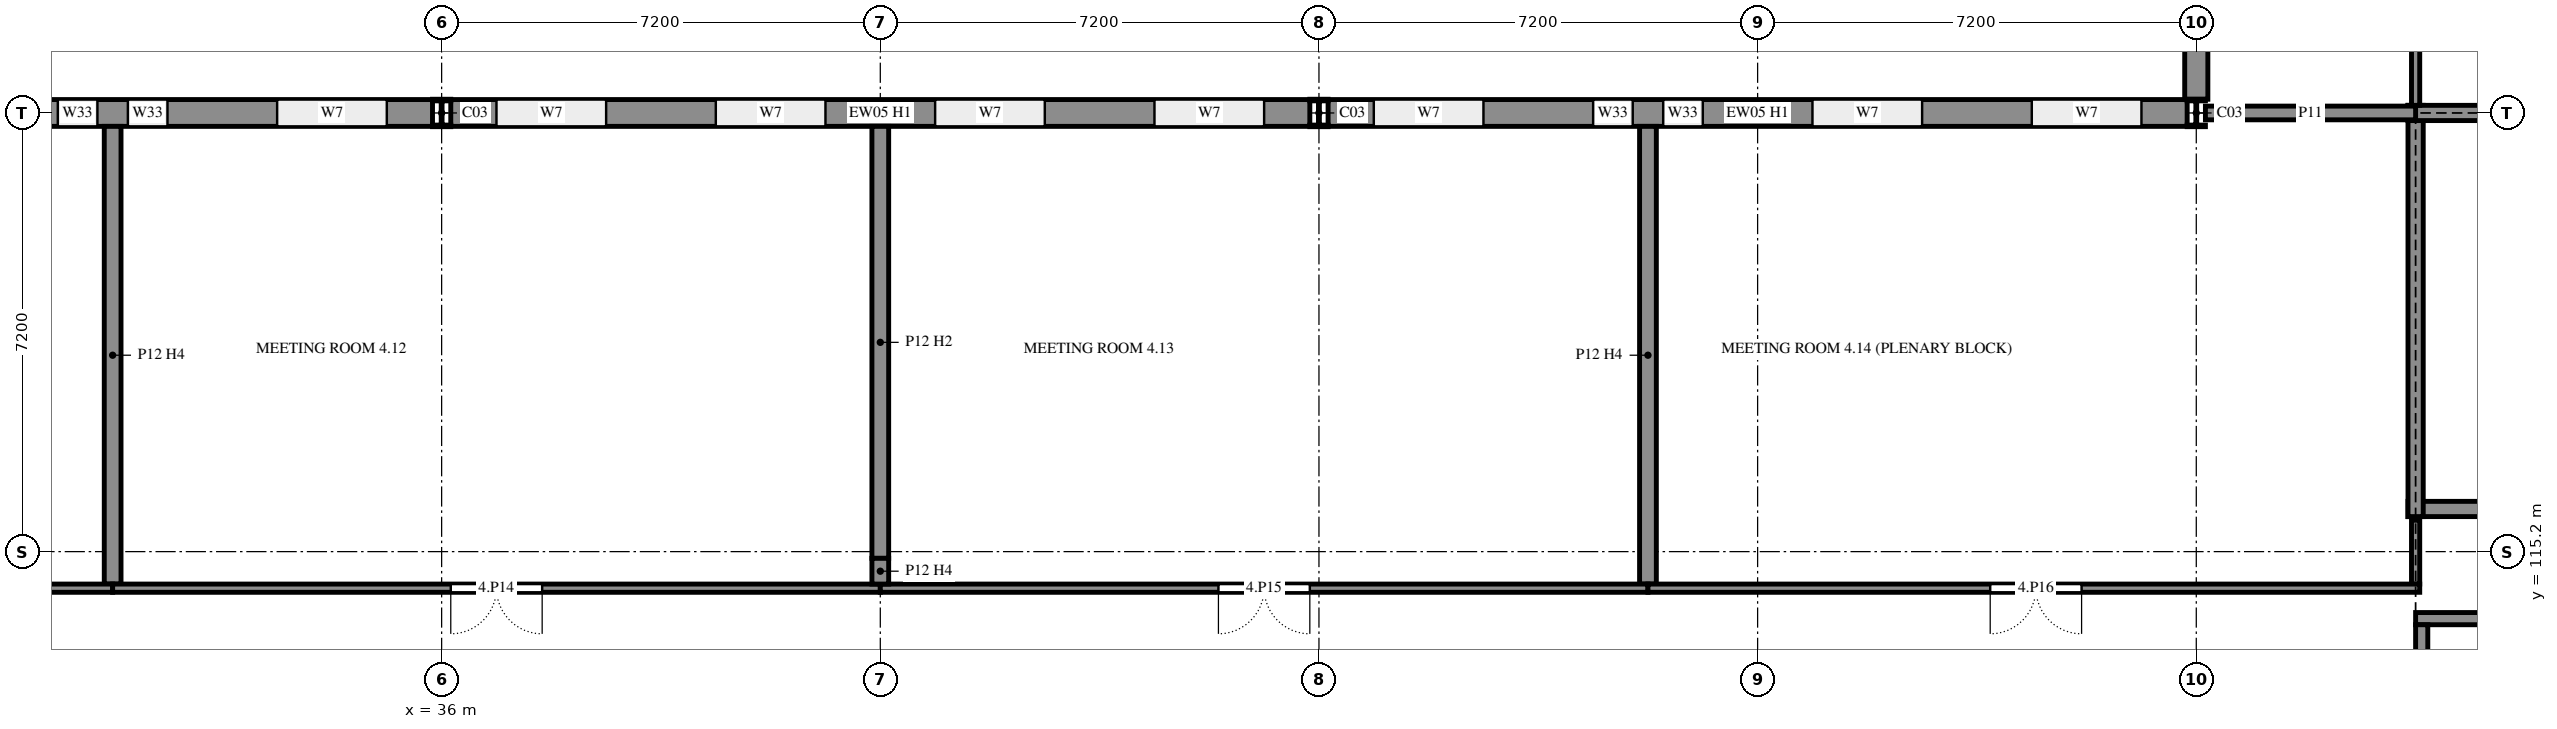
"""IFC4 building model, lengths in metres.
Left out: names, types, materials, properties, quantities, classifications, styles, units other than length and angle.
Written with IfcOpenShell. Run it as: python <this file> out.ifc"""

import sys

from ifc_helpers import new_model, si_unit, direction, frame, frame_2d, origin, origin_2d, place, context, subcontext, project, spatial, rectangle, i_section, extrude, element, fill, save


model = new_model("IFC4")
c1 = context("Model", 3, precision=1e-05, world=origin(), true_north=direction((0.0, 1.0)))
c2 = subcontext(c1, "Body", "Model", "MODEL_VIEW")
j1 = project(units=[si_unit("LENGTHUNIT", "METRE"), si_unit("PLANEANGLEUNIT", "RADIAN")], contexts=[c1])
p1 = place(None, origin())
s1 = spatial("IfcSite", under=j1, at=p1, CompositionType="ELEMENT")
p2 = place(p1, origin())
s2 = spatial("IfcBuilding", under=s1, at=p2, CompositionType="ELEMENT")
p3 = place(p2, frame((0.0, 0.0, 14.4)))
s3 = spatial("IfcBuildingStorey", under=s2, at=p3, CompositionType="ELEMENT", Elevation=14.4)
for number, where, z_axis, x_axis in (
    (1, (36.0, 122.4, 0.0), (0.0, 0.0, 1.0), (1.0, 0.0, 0.0)),
    (2, (50.4, 122.4, 0.0), (0.0, 0.0, 1.0), (1.0, 0.0, 0.0)),
    (3, (64.8, 122.4, 0.0), (0.0, 0.0, 1.0), (1.0, 0.0, 0.0)),
):
    element("IfcColumn", number, at=place(p3, frame(where, z_axis=z_axis, x_axis=x_axis)), inside=s3, PredefinedType="COLUMN", context=c2, shape_type="SweptSolid", body=[
        extrude(i_section(OverallWidth=0.3, OverallDepth=0.45, WebThickness=0.014, FlangeThickness=0.026, FilletRadius=0.027, at=origin_2d()), origin(), (0.0, 0.0, 1.0), 3.6),
    ])
p4 = place(p3, frame((68.275, 115.9, 0.0), z_axis=(0.0, 0.0, 1.0), x_axis=(1.0, 0.0, 0.0)))
e4 = element("IfcWall", 4, at=p4, inside=s3, PredefinedType="SHEAR", context=c2, shape_type="SweptSolid", body=[
    extrude(rectangle(XDim=5.25, YDim=0.25, at=frame_2d((2.625, 0.0))), origin(), (0.0, 0.0, 1.0), 3.6),
])
p5 = place(p4, frame((1.975, 0.0, 0.0)))
e5 = element("IfcOpeningElement", 5, at=p5, cuts=e4, PredefinedType="OPENING", context=c2, shape_type="SweptSolid", body=[
    extrude(rectangle(XDim=1.2, YDim=2.4, at=frame_2d((0.6, 1.2))), frame((0.0, 0.135, 0.0), z_axis=(0.0, -1.0, 0.0), x_axis=(1.0, 0.0, 0.0)), (0.0, 0.0, 1.0), 0.27),
])
p6 = place(p3, frame((68.4, 122.525, 0.0), z_axis=(0.0, 0.0, 1.0), x_axis=(0.0, -1.0, 0.0)))
e6 = element("IfcWall", 6, at=p6, inside=s3, PredefinedType="SHEAR", context=c2, shape_type="SweptSolid", body=[
    extrude(rectangle(XDim=6.75, YDim=0.25, at=frame_2d((3.375, 0.0))), origin(), (0.0, 0.0, 1.0), 3.6),
])
p7 = place(p3, frame((73.525, 122.4, 0.0), z_axis=(0.0, 0.0, 1.0), x_axis=(-1.0, 0.0, 0.0)))
e7 = element("IfcWall", 7, at=p7, inside=s3, PredefinedType="SHEAR", context=c2, shape_type="SweptSolid", body=[
    extrude(rectangle(XDim=5.25, YDim=0.25, at=frame_2d((2.625, 0.0))), origin(), (0.0, 0.0, 1.0), 3.6),
])
p8 = place(p3, frame((64.65, 122.4, 0.0), z_axis=(0.0, 0.0, 1.0), x_axis=(-1.0, 0.0, 0.0)))
e8 = element("IfcWall", 8, at=p8, inside=s3, PredefinedType="SOLIDWALL", context=c2, shape_type="SweptSolid", body=[
    extrude(rectangle(XDim=14.1, YDim=0.44, at=frame_2d((7.05, 0.0))), origin(), (0.0, 0.0, 1.0), 2.82),
])
p9 = place(p8, frame((11.55, 0.0, 0.75)))
e9 = element("IfcOpeningElement", 9, at=p9, cuts=e8, PredefinedType="OPENING", context=c2, shape_type="SweptSolid", body=[
    extrude(rectangle(XDim=1.8, YDim=1.8, at=frame_2d((0.9, 0.9))), frame((0.0, 0.23, 0.0), z_axis=(0.0, -1.0, 0.0), x_axis=(1.0, 0.0, 0.0)), (0.0, 0.0, 1.0), 0.46),
])
p10 = place(p8, frame((7.95, 0.0, 0.75)))
e10 = element("IfcOpeningElement", 10, at=p10, cuts=e8, PredefinedType="OPENING", context=c2, shape_type="SweptSolid", body=[
    extrude(rectangle(XDim=0.65, YDim=1.8, at=frame_2d((0.325, 0.9))), frame((0.0, 0.23, 0.0), z_axis=(0.0, -1.0, 0.0), x_axis=(1.0, 0.0, 0.0)), (0.0, 0.0, 1.0), 0.46),
])
p11 = place(p8, frame((9.1, 0.0, 0.75)))
e11 = element("IfcOpeningElement", 11, at=p11, cuts=e8, PredefinedType="OPENING", context=c2, shape_type="SweptSolid", body=[
    extrude(rectangle(XDim=0.65, YDim=1.8, at=frame_2d((0.325, 0.9))), frame((0.0, 0.23, 0.0), z_axis=(0.0, -1.0, 0.0), x_axis=(1.0, 0.0, 0.0)), (0.0, 0.0, 1.0), 0.46),
])
p12 = place(p8, frame((4.35, 0.0, 0.75)))
e12 = element("IfcOpeningElement", 12, at=p12, cuts=e8, PredefinedType="OPENING", context=c2, shape_type="SweptSolid", body=[
    extrude(rectangle(XDim=1.8, YDim=1.8, at=frame_2d((0.9, 0.9))), frame((0.0, 0.23, 0.0), z_axis=(0.0, -1.0, 0.0), x_axis=(1.0, 0.0, 0.0)), (0.0, 0.0, 1.0), 0.46),
])
p13 = place(p8, frame((0.75, 0.0, 0.75)))
e13 = element("IfcOpeningElement", 13, at=p13, cuts=e8, PredefinedType="OPENING", context=c2, shape_type="SweptSolid", body=[
    extrude(rectangle(XDim=1.8, YDim=1.8, at=frame_2d((0.9, 0.9))), frame((0.0, 0.23, 0.0), z_axis=(0.0, -1.0, 0.0), x_axis=(1.0, 0.0, 0.0)), (0.0, 0.0, 1.0), 0.46),
])
p14 = place(p3, frame((50.25, 122.4, 0.0), z_axis=(0.0, 0.0, 1.0), x_axis=(-1.0, 0.0, 0.0)))
e14 = element("IfcWall", 14, at=p14, inside=s3, PredefinedType="SOLIDWALL", context=c2, shape_type="SweptSolid", body=[
    extrude(rectangle(XDim=14.1, YDim=0.44, at=frame_2d((7.05, 0.0))), origin(), (0.0, 0.0, 1.0), 2.82),
])
p15 = place(p14, frame((11.55, 0.0, 0.75)))
e15 = element("IfcOpeningElement", 15, at=p15, cuts=e14, PredefinedType="OPENING", context=c2, shape_type="SweptSolid", body=[
    extrude(rectangle(XDim=1.8, YDim=1.8, at=frame_2d((0.9, 0.9))), frame((0.0, 0.23, 0.0), z_axis=(0.0, -1.0, 0.0), x_axis=(1.0, 0.0, 0.0)), (0.0, 0.0, 1.0), 0.46),
])
p16 = place(p14, frame((7.95, 0.0, 0.75)))
e16 = element("IfcOpeningElement", 16, at=p16, cuts=e14, PredefinedType="OPENING", context=c2, shape_type="SweptSolid", body=[
    extrude(rectangle(XDim=1.8, YDim=1.8, at=frame_2d((0.9, 0.9))), frame((0.0, 0.23, 0.0), z_axis=(0.0, -1.0, 0.0), x_axis=(1.0, 0.0, 0.0)), (0.0, 0.0, 1.0), 0.46),
])
p17 = place(p14, frame((4.35, 0.0, 0.75)))
e17 = element("IfcOpeningElement", 17, at=p17, cuts=e14, PredefinedType="OPENING", context=c2, shape_type="SweptSolid", body=[
    extrude(rectangle(XDim=1.8, YDim=1.8, at=frame_2d((0.9, 0.9))), frame((0.0, 0.23, 0.0), z_axis=(0.0, -1.0, 0.0), x_axis=(1.0, 0.0, 0.0)), (0.0, 0.0, 1.0), 0.46),
])
p18 = place(p14, frame((0.75, 0.0, 0.75)))
e18 = element("IfcOpeningElement", 18, at=p18, cuts=e14, PredefinedType="OPENING", context=c2, shape_type="SweptSolid", body=[
    extrude(rectangle(XDim=1.8, YDim=1.8, at=frame_2d((0.9, 0.9))), frame((0.0, 0.23, 0.0), z_axis=(0.0, -1.0, 0.0), x_axis=(1.0, 0.0, 0.0)), (0.0, 0.0, 1.0), 0.46),
])
p19 = place(p3, frame((35.85, 122.4, 0.0), z_axis=(0.0, 0.0, 1.0), x_axis=(-1.0, 0.0, 0.0)))
e19 = element("IfcWall", 19, at=p19, inside=s3, PredefinedType="SOLIDWALL", context=c2, shape_type="SweptSolid", body=[
    extrude(rectangle(XDim=14.1, YDim=0.44, at=frame_2d((7.05, 0.0))), origin(), (0.0, 0.0, 1.0), 2.82),
])
p20 = place(p19, frame((11.55, 0.0, 0.75)))
e20 = element("IfcOpeningElement", 20, at=p20, cuts=e19, PredefinedType="OPENING", context=c2, shape_type="SweptSolid", body=[
    extrude(rectangle(XDim=1.8, YDim=1.8, at=frame_2d((0.9, 0.9))), frame((0.0, 0.23, 0.0), z_axis=(0.0, -1.0, 0.0), x_axis=(1.0, 0.0, 0.0)), (0.0, 0.0, 1.0), 0.46),
])
p21 = place(p19, frame((7.95, 0.0, 0.75)))
e21 = element("IfcOpeningElement", 21, at=p21, cuts=e19, PredefinedType="OPENING", context=c2, shape_type="SweptSolid", body=[
    extrude(rectangle(XDim=1.8, YDim=1.8, at=frame_2d((0.9, 0.9))), frame((0.0, 0.23, 0.0), z_axis=(0.0, -1.0, 0.0), x_axis=(1.0, 0.0, 0.0)), (0.0, 0.0, 1.0), 0.46),
])
p22 = place(p19, frame((4.35, 0.0, 0.75)))
e22 = element("IfcOpeningElement", 22, at=p22, cuts=e19, PredefinedType="OPENING", context=c2, shape_type="SweptSolid", body=[
    extrude(rectangle(XDim=0.65, YDim=1.8, at=frame_2d((0.325, 0.9))), frame((0.0, 0.23, 0.0), z_axis=(0.0, -1.0, 0.0), x_axis=(1.0, 0.0, 0.0)), (0.0, 0.0, 1.0), 0.46),
])
p23 = place(p19, frame((5.5, 0.0, 0.75)))
e23 = element("IfcOpeningElement", 23, at=p23, cuts=e19, PredefinedType="OPENING", context=c2, shape_type="SweptSolid", body=[
    extrude(rectangle(XDim=0.65, YDim=1.8, at=frame_2d((0.325, 0.9))), frame((0.0, 0.23, 0.0), z_axis=(0.0, -1.0, 0.0), x_axis=(1.0, 0.0, 0.0)), (0.0, 0.0, 1.0), 0.46),
])
p24 = place(p19, frame((0.75, 0.0, 0.75)))
e24 = element("IfcOpeningElement", 24, at=p24, cuts=e19, PredefinedType="OPENING", context=c2, shape_type="SweptSolid", body=[
    extrude(rectangle(XDim=1.8, YDim=1.8, at=frame_2d((0.9, 0.9))), frame((0.0, 0.23, 0.0), z_axis=(0.0, -1.0, 0.0), x_axis=(1.0, 0.0, 0.0)), (0.0, 0.0, 1.0), 0.46),
])
p25 = place(p3, frame((64.8, 131.775, 0.0), z_axis=(0.0, 0.0, 1.0), x_axis=(0.0, -1.0, 0.0)))
e25 = element("IfcWall", 25, at=p25, inside=s3, PredefinedType="SOLIDWALL", context=c2, shape_type="SweptSolid", body=[
    extrude(rectangle(XDim=9.15, YDim=0.38, at=frame_2d((4.575, 0.0))), origin(), (0.0, 0.0, 1.0), 3.06),
])
p26 = place(p3, frame((64.95, 122.4, 0.0), z_axis=(0.0, 0.0, 1.0), x_axis=(1.0, 0.0, 0.0)))
e26 = element("IfcWall", 26, at=p26, inside=s3, PredefinedType="PARTITIONING", context=c2, shape_type="SweptSolid", body=[
    extrude(rectangle(XDim=3.45, YDim=0.225, at=frame_2d((1.725, 0.0))), origin(), (0.0, 0.0, 1.0), 3.22),
])
p27 = place(p3, frame((68.4, 114.1, 0.0), z_axis=(0.0, 0.0, 1.0), x_axis=(1.0, 0.0, 0.0)))
e27 = element("IfcWall", 27, at=p27, inside=s3, PredefinedType="SHEAR", context=c2, shape_type="SweptSolid", body=[
    extrude(rectangle(XDim=3.0, YDim=0.2, at=frame_2d((1.5, 0.0))), origin(), (0.0, 0.0, 1.0), 4.5),
])
p28 = place(p3, frame((68.5, 111.8, 0.0), z_axis=(0.0, 0.0, 1.0), x_axis=(0.0, 1.0, 0.0)))
e28 = element("IfcWall", 28, at=p28, inside=s3, PredefinedType="SHEAR", context=c2, shape_type="SweptSolid", body=[
    extrude(rectangle(XDim=2.2, YDim=0.2, at=frame_2d((1.1, 0.0))), origin(), (0.0, 0.0, 1.0), 4.5),
])
p29 = place(p3, frame((68.4, 114.667, 0.0), z_axis=(0.0, 0.0, 1.0), x_axis=(0.0, 1.0, 0.0)))
e29 = element("IfcWall", 29, at=p29, inside=s3, PredefinedType="PARTITIONING", context=c2, shape_type="SweptSolid", body=[
    extrude(rectangle(XDim=1.048, YDim=0.135, at=frame_2d((0.524, 0.0))), origin(), (0.0, 0.0, 1.0), 3.42),
])
p30 = place(p3, frame((30.6, 122.18, 0.0), z_axis=(0.0, 0.0, 1.0), x_axis=(0.0, -1.0, 0.0)))
e30 = element("IfcWall", 30, at=p30, inside=s3, PredefinedType="PARTITIONING", context=c2, shape_type="SweptSolid", body=[
    extrude(rectangle(XDim=7.512, YDim=0.275, at=frame_2d((3.756, 0.0))), origin(), (0.0, 0.0, 1.0), 3.42),
])
p31 = place(p3, frame((30.6, 114.6, 0.0), z_axis=(0.0, 0.0, 1.0), x_axis=(-1.0, 0.0, 0.0)))
e31 = element("IfcWall", 31, at=p31, inside=s3, PredefinedType="PARTITIONING", context=c2, shape_type="SweptSolid", body=[
    extrude(rectangle(XDim=12.667, YDim=0.135, at=frame_2d((6.334, 0.0))), origin(), (0.0, 0.0, 1.0), 3.42),
])
p32 = place(p31, frame((5.55, 0.0, 0.0)))
e32 = element("IfcOpeningElement", 32, at=p32, cuts=e31, PredefinedType="OPENING", context=c2, shape_type="SweptSolid", body=[
    extrude(rectangle(XDim=1.5, YDim=2.1, at=frame_2d((0.75, 1.05))), frame((0.0, 0.077, 0.0), z_axis=(0.0, -1.0, 0.0), x_axis=(1.0, 0.0, 0.0)), (0.0, 0.0, 1.0), 0.155),
])
p33 = place(p3, frame((43.2, 122.18, 0.0), z_axis=(0.0, 0.0, 1.0), x_axis=(0.0, -1.0, 0.0)))
e33 = element("IfcWall", 33, at=p33, inside=s3, PredefinedType="PARTITIONING", context=c2, shape_type="SweptSolid", body=[
    extrude(rectangle(XDim=7.09, YDim=0.275, at=frame_2d((3.545, 0.0))), origin(), (0.0, 0.0, 1.0), 3.12),
])
p34 = place(p3, frame((43.2, 114.6, 0.0), z_axis=(0.0, 0.0, 1.0), x_axis=(-1.0, 0.0, 0.0)))
e34 = element("IfcWall", 34, at=p34, inside=s3, PredefinedType="PARTITIONING", context=c2, shape_type="SweptSolid", body=[
    extrude(rectangle(XDim=12.6, YDim=0.135, at=frame_2d((6.3, 0.0))), origin(), (0.0, 0.0, 1.0), 3.42),
])
p35 = place(p34, frame((5.55, 0.0, 0.0)))
e35 = element("IfcOpeningElement", 35, at=p35, cuts=e34, PredefinedType="OPENING", context=c2, shape_type="SweptSolid", body=[
    extrude(rectangle(XDim=1.5, YDim=2.1, at=frame_2d((0.75, 1.05))), frame((0.0, 0.077, 0.0), z_axis=(0.0, -1.0, 0.0), x_axis=(1.0, 0.0, 0.0)), (0.0, 0.0, 1.0), 0.155),
])
p36 = place(p3, frame((55.8, 122.18, 0.0), z_axis=(0.0, 0.0, 1.0), x_axis=(0.0, -1.0, 0.0)))
e36 = element("IfcWall", 36, at=p36, inside=s3, PredefinedType="PARTITIONING", context=c2, shape_type="SweptSolid", body=[
    extrude(rectangle(XDim=7.512, YDim=0.275, at=frame_2d((3.756, 0.0))), origin(), (0.0, 0.0, 1.0), 3.42),
])
p37 = place(p3, frame((55.8, 114.6, 0.0), z_axis=(0.0, 0.0, 1.0), x_axis=(-1.0, 0.0, 0.0)))
e37 = element("IfcWall", 37, at=p37, inside=s3, PredefinedType="PARTITIONING", context=c2, shape_type="SweptSolid", body=[
    extrude(rectangle(XDim=12.6, YDim=0.135, at=frame_2d((6.3, 0.0))), origin(), (0.0, 0.0, 1.0), 3.42),
])
p38 = place(p37, frame((5.55, 0.0, 0.0)))
e38 = element("IfcOpeningElement", 38, at=p38, cuts=e37, PredefinedType="OPENING", context=c2, shape_type="SweptSolid", body=[
    extrude(rectangle(XDim=1.5, YDim=2.1, at=frame_2d((0.75, 1.05))), frame((0.0, 0.077, 0.0), z_axis=(0.0, -1.0, 0.0), x_axis=(1.0, 0.0, 0.0)), (0.0, 0.0, 1.0), 0.155),
])
p39 = place(p3, frame((68.468, 114.6, 0.0), z_axis=(0.0, 0.0, 1.0), x_axis=(-1.0, 0.0, 0.0)))
e39 = element("IfcWall", 39, at=p39, inside=s3, PredefinedType="PARTITIONING", context=c2, shape_type="SweptSolid", body=[
    extrude(rectangle(XDim=12.667, YDim=0.135, at=frame_2d((6.334, 0.0))), origin(), (0.0, 0.0, 1.0), 3.42),
])
p40 = place(p39, frame((5.55, 0.0, 0.0)))
e40 = element("IfcOpeningElement", 40, at=p40, cuts=e39, PredefinedType="OPENING", context=c2, shape_type="SweptSolid", body=[
    extrude(rectangle(XDim=1.5, YDim=2.1, at=frame_2d((0.75, 1.05))), frame((0.0, 0.077, 0.0), z_axis=(0.0, -1.0, 0.0), x_axis=(1.0, 0.0, 0.0)), (0.0, 0.0, 1.0), 0.155),
])
p41 = place(p3, frame((68.4, 122.525, 0.0), z_axis=(0.0, 0.0, 1.0), x_axis=(0.0, 1.0, 0.0)))
e41 = element("IfcWall", 41, at=p41, inside=s3, PredefinedType="PARTITIONING", context=c2, shape_type="SweptSolid", body=[
    extrude(rectangle(XDim=9.408, YDim=0.135, at=frame_2d((4.704, 0.0))), origin(), (0.0, 0.0, 1.0), 3.06),
])
p42 = place(p3, frame((43.2, 115.09, 0.0), z_axis=(0.0, 0.0, 1.0), x_axis=(0.0, -1.0, 0.0)))
e42 = element("IfcWall", 42, at=p42, inside=s3, PredefinedType="PARTITIONING", context=c2, shape_type="SweptSolid", body=[
    extrude(rectangle(XDim=0.423, YDim=0.275, at=frame_2d((0.211, 0.0))), origin(), (0.0, 0.0, 1.0), 3.42),
])
p43 = place(p9, origin())
e43 = element("IfcWindow", 43, at=p43, inside=s3, PartitioningType="SINGLE_PANEL", PredefinedType="WINDOW", context=c2, shape_type="SweptSolid", body=[
    extrude(rectangle(XDim=1.8, YDim=1.8, at=frame_2d((0.9, 0.9))), frame((0.0, 0.03, 0.0), z_axis=(0.0, -1.0, 0.0), x_axis=(1.0, 0.0, 0.0)), (0.0, 0.0, 1.0), 0.06),
])
fill(e9, e43)
p44 = place(p10, origin())
e44 = element("IfcWindow", 44, at=p44, inside=s3, PartitioningType="SINGLE_PANEL", PredefinedType="WINDOW", context=c2, shape_type="SweptSolid", body=[
    extrude(rectangle(XDim=0.65, YDim=1.8, at=frame_2d((0.325, 0.9))), frame((0.0, 0.03, 0.0), z_axis=(0.0, -1.0, 0.0), x_axis=(1.0, 0.0, 0.0)), (0.0, 0.0, 1.0), 0.06),
])
fill(e10, e44)
p45 = place(p11, origin())
e45 = element("IfcWindow", 45, at=p45, inside=s3, PartitioningType="SINGLE_PANEL", PredefinedType="WINDOW", context=c2, shape_type="SweptSolid", body=[
    extrude(rectangle(XDim=0.65, YDim=1.8, at=frame_2d((0.325, 0.9))), frame((0.0, 0.03, 0.0), z_axis=(0.0, -1.0, 0.0), x_axis=(1.0, 0.0, 0.0)), (0.0, 0.0, 1.0), 0.06),
])
fill(e11, e45)
p46 = place(p12, origin())
e46 = element("IfcWindow", 46, at=p46, inside=s3, PartitioningType="SINGLE_PANEL", PredefinedType="WINDOW", context=c2, shape_type="SweptSolid", body=[
    extrude(rectangle(XDim=1.8, YDim=1.8, at=frame_2d((0.9, 0.9))), frame((0.0, 0.03, 0.0), z_axis=(0.0, -1.0, 0.0), x_axis=(1.0, 0.0, 0.0)), (0.0, 0.0, 1.0), 0.06),
])
fill(e12, e46)
p47 = place(p13, origin())
e47 = element("IfcWindow", 47, at=p47, inside=s3, PartitioningType="SINGLE_PANEL", PredefinedType="WINDOW", context=c2, shape_type="SweptSolid", body=[
    extrude(rectangle(XDim=1.8, YDim=1.8, at=frame_2d((0.9, 0.9))), frame((0.0, 0.03, 0.0), z_axis=(0.0, -1.0, 0.0), x_axis=(1.0, 0.0, 0.0)), (0.0, 0.0, 1.0), 0.06),
])
fill(e13, e47)
p48 = place(p15, origin())
e48 = element("IfcWindow", 48, at=p48, inside=s3, PartitioningType="SINGLE_PANEL", PredefinedType="WINDOW", context=c2, shape_type="SweptSolid", body=[
    extrude(rectangle(XDim=1.8, YDim=1.8, at=frame_2d((0.9, 0.9))), frame((0.0, 0.03, 0.0), z_axis=(0.0, -1.0, 0.0), x_axis=(1.0, 0.0, 0.0)), (0.0, 0.0, 1.0), 0.06),
])
fill(e15, e48)
p49 = place(p16, origin())
e49 = element("IfcWindow", 49, at=p49, inside=s3, PartitioningType="SINGLE_PANEL", PredefinedType="WINDOW", context=c2, shape_type="SweptSolid", body=[
    extrude(rectangle(XDim=1.8, YDim=1.8, at=frame_2d((0.9, 0.9))), frame((0.0, 0.03, 0.0), z_axis=(0.0, -1.0, 0.0), x_axis=(1.0, 0.0, 0.0)), (0.0, 0.0, 1.0), 0.06),
])
fill(e16, e49)
p50 = place(p17, origin())
e50 = element("IfcWindow", 50, at=p50, inside=s3, PartitioningType="SINGLE_PANEL", PredefinedType="WINDOW", context=c2, shape_type="SweptSolid", body=[
    extrude(rectangle(XDim=1.8, YDim=1.8, at=frame_2d((0.9, 0.9))), frame((0.0, 0.03, 0.0), z_axis=(0.0, -1.0, 0.0), x_axis=(1.0, 0.0, 0.0)), (0.0, 0.0, 1.0), 0.06),
])
fill(e17, e50)
p51 = place(p18, origin())
e51 = element("IfcWindow", 51, at=p51, inside=s3, PartitioningType="SINGLE_PANEL", PredefinedType="WINDOW", context=c2, shape_type="SweptSolid", body=[
    extrude(rectangle(XDim=1.8, YDim=1.8, at=frame_2d((0.9, 0.9))), frame((0.0, 0.03, 0.0), z_axis=(0.0, -1.0, 0.0), x_axis=(1.0, 0.0, 0.0)), (0.0, 0.0, 1.0), 0.06),
])
fill(e18, e51)
p52 = place(p22, origin())
e52 = element("IfcWindow", 52, at=p52, inside=s3, PartitioningType="SINGLE_PANEL", PredefinedType="WINDOW", context=c2, shape_type="SweptSolid", body=[
    extrude(rectangle(XDim=0.65, YDim=1.8, at=frame_2d((0.325, 0.9))), frame((0.0, 0.03, 0.0), z_axis=(0.0, -1.0, 0.0), x_axis=(1.0, 0.0, 0.0)), (0.0, 0.0, 1.0), 0.06),
])
fill(e22, e52)
p53 = place(p23, origin())
e53 = element("IfcWindow", 53, at=p53, inside=s3, PartitioningType="SINGLE_PANEL", PredefinedType="WINDOW", context=c2, shape_type="SweptSolid", body=[
    extrude(rectangle(XDim=0.65, YDim=1.8, at=frame_2d((0.325, 0.9))), frame((0.0, 0.03, 0.0), z_axis=(0.0, -1.0, 0.0), x_axis=(1.0, 0.0, 0.0)), (0.0, 0.0, 1.0), 0.06),
])
fill(e23, e53)
p54 = place(p24, origin())
e54 = element("IfcWindow", 54, at=p54, inside=s3, PartitioningType="SINGLE_PANEL", PredefinedType="WINDOW", context=c2, shape_type="SweptSolid", body=[
    extrude(rectangle(XDim=1.8, YDim=1.8, at=frame_2d((0.9, 0.9))), frame((0.0, 0.03, 0.0), z_axis=(0.0, -1.0, 0.0), x_axis=(1.0, 0.0, 0.0)), (0.0, 0.0, 1.0), 0.06),
])
fill(e24, e54)
p55 = place(p35, origin())
e55 = element("IfcDoor", 55, at=p55, inside=s3, OperationType="DOUBLE_DOOR_SINGLE_SWING", PredefinedType="DOOR", context=c2, shape_type="SweptSolid", body=[
    extrude(rectangle(XDim=1.5, YDim=2.1, at=frame_2d((0.75, 1.05))), frame((0.0, 0.025, 0.0), z_axis=(0.0, -1.0, 0.0), x_axis=(1.0, 0.0, 0.0)), (0.0, 0.0, 1.0), 0.05),
])
fill(e35, e55)
p56 = place(p38, origin())
e56 = element("IfcDoor", 56, at=p56, inside=s3, OperationType="DOUBLE_DOOR_SINGLE_SWING", PredefinedType="DOOR", context=c2, shape_type="SweptSolid", body=[
    extrude(rectangle(XDim=1.5, YDim=2.1, at=frame_2d((0.75, 1.05))), frame((0.0, 0.025, 0.0), z_axis=(0.0, -1.0, 0.0), x_axis=(1.0, 0.0, 0.0)), (0.0, 0.0, 1.0), 0.05),
])
fill(e38, e56)
p57 = place(p40, origin())
e57 = element("IfcDoor", 57, at=p57, inside=s3, OperationType="DOUBLE_DOOR_SINGLE_SWING", PredefinedType="DOOR", context=c2, shape_type="SweptSolid", body=[
    extrude(rectangle(XDim=1.5, YDim=2.1, at=frame_2d((0.75, 1.05))), frame((0.0, 0.025, 0.0), z_axis=(0.0, -1.0, 0.0), x_axis=(1.0, 0.0, 0.0)), (0.0, 0.0, 1.0), 0.05),
])
fill(e40, e57)
save(model, sys.argv[1])
